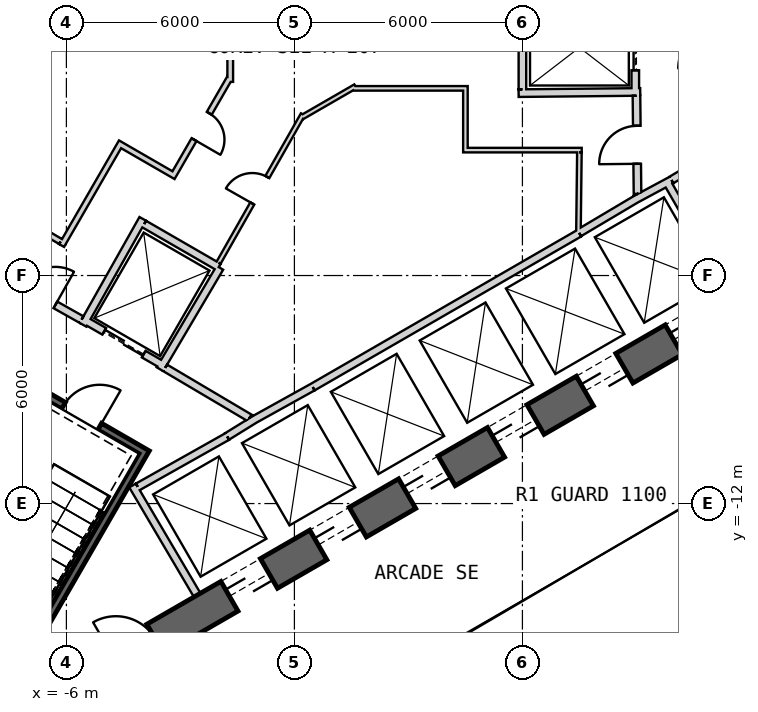
"""IFC4 building model, lengths in metres.
Left out: names, types, materials, properties, quantities, classifications, styles, units other than length and angle.
Written with IfcOpenShell. Run it as: python <this file> out.ifc"""

import sys

from ifc_helpers import new_model, si_unit, direction, frame, frame_2d, origin, place, context, subcontext, project, spatial, rectangle, extrude, element, fill, save


model = new_model("IFC4")
c1 = context("Model", 3, precision=1e-05, world=origin(), true_north=direction((0.0, 1.0)))
c2 = subcontext(c1, "Body", "Model", "MODEL_VIEW")
j1 = project(units=[si_unit("LENGTHUNIT", "METRE"), si_unit("PLANEANGLEUNIT", "RADIAN")], contexts=[c1])
p1 = place(None, origin())
s1 = spatial("IfcSite", under=j1, at=p1, CompositionType="ELEMENT")
p2 = place(p1, origin())
s2 = spatial("IfcBuilding", under=s1, at=p2, CompositionType="ELEMENT")
p3 = place(p2, frame((0.0, 0.0, 27.5)))
s3 = spatial("IfcBuildingStorey", under=s2, at=p3, CompositionType="ELEMENT", Elevation=27.5)
p4 = place(p3, frame((-7.825, -17.97, 0.0), z_axis=(0.0, 0.0, 1.0), x_axis=(0.866028369851, 0.499994862586, 0.0)))
e1 = element("IfcWall", 1, at=p4, inside=s3, PredefinedType="SHEAR", context=c2, shape_type="SweptSolid", body=[
    extrude(rectangle(XDim=31.523, YDim=0.9, at=frame_2d((15.762, 0.0))), origin(), (0.0, 0.0, 1.0), 6.0),
])
p5 = place(p4, frame((7.062, 0.0, 0.0)))
e2 = element("IfcOpeningElement", 2, at=p5, cuts=e1, PredefinedType="OPENING", context=c2, shape_type="SweptSolid", body=[
    extrude(rectangle(XDim=1.2, YDim=2.4, at=frame_2d((0.6, 1.2))), frame((0.0, 0.46, 0.0), z_axis=(0.0, -1.0, 0.0), x_axis=(1.0, 0.0, 0.0)), (0.0, 0.0, 1.0), 0.92),
])
p6 = place(p4, frame((9.762, 0.0, 0.0)))
e3 = element("IfcOpeningElement", 3, at=p6, cuts=e1, PredefinedType="OPENING", context=c2, shape_type="SweptSolid", body=[
    extrude(rectangle(XDim=1.2, YDim=2.4, at=frame_2d((0.6, 1.2))), frame((0.0, 0.46, 0.0), z_axis=(0.0, -1.0, 0.0), x_axis=(1.0, 0.0, 0.0)), (0.0, 0.0, 1.0), 0.92),
])
p7 = place(p4, frame((12.462, 0.0, 0.0)))
e4 = element("IfcOpeningElement", 4, at=p7, cuts=e1, PredefinedType="OPENING", context=c2, shape_type="SweptSolid", body=[
    extrude(rectangle(XDim=1.2, YDim=2.4, at=frame_2d((0.6, 1.2))), frame((0.0, 0.46, 0.0), z_axis=(0.0, -1.0, 0.0), x_axis=(1.0, 0.0, 0.0)), (0.0, 0.0, 1.0), 0.92),
])
p8 = place(p4, frame((15.162, 0.0, 0.0)))
e5 = element("IfcOpeningElement", 5, at=p8, cuts=e1, PredefinedType="OPENING", context=c2, shape_type="SweptSolid", body=[
    extrude(rectangle(XDim=1.2, YDim=2.4, at=frame_2d((0.6, 1.2))), frame((0.0, 0.46, 0.0), z_axis=(0.0, -1.0, 0.0), x_axis=(1.0, 0.0, 0.0)), (0.0, 0.0, 1.0), 0.92),
])
p9 = place(p4, frame((17.862, 0.0, 0.0)))
e6 = element("IfcOpeningElement", 6, at=p9, cuts=e1, PredefinedType="OPENING", context=c2, shape_type="SweptSolid", body=[
    extrude(rectangle(XDim=1.2, YDim=2.4, at=frame_2d((0.6, 1.2))), frame((0.0, 0.46, 0.0), z_axis=(0.0, -1.0, 0.0), x_axis=(1.0, 0.0, 0.0)), (0.0, 0.0, 1.0), 0.92),
])
p10 = place(p4, frame((20.562, 0.0, 0.0)))
e7 = element("IfcOpeningElement", 7, at=p10, cuts=e1, PredefinedType="OPENING", context=c2, shape_type="SweptSolid", body=[
    extrude(rectangle(XDim=1.2, YDim=2.4, at=frame_2d((0.6, 1.2))), frame((0.0, 0.46, 0.0), z_axis=(0.0, -1.0, 0.0), x_axis=(1.0, 0.0, 0.0)), (0.0, 0.0, 1.0), 0.92),
])
p11 = place(p4, frame((26.712, 0.0, 0.0)))
e8 = element("IfcOpeningElement", 8, at=p11, cuts=e1, PredefinedType="OPENING", context=c2, shape_type="SweptSolid", body=[
    extrude(rectangle(XDim=1.2, YDim=2.4, at=frame_2d((0.6, 1.2))), frame((0.0, 0.46, 0.0), z_axis=(0.0, -1.0, 0.0), x_axis=(1.0, 0.0, 0.0)), (0.0, 0.0, 1.0), 0.92),
])
p12 = place(p4, frame((3.612, 0.0, 0.0)))
e9 = element("IfcOpeningElement", 9, at=p12, cuts=e1, PredefinedType="OPENING", context=c2, shape_type="SweptSolid", body=[
    extrude(rectangle(XDim=1.2, YDim=2.4, at=frame_2d((0.6, 1.2))), frame((0.0, 0.46, 0.0), z_axis=(0.0, -1.0, 0.0), x_axis=(1.0, 0.0, 0.0)), (0.0, 0.0, 1.0), 0.92),
])
p13 = place(p3, frame((0.483, -8.936, 0.0), z_axis=(0.0, 0.0, 1.0), x_axis=(0.866030989016, 0.499990325971, 0.0)))
e10 = element("IfcWall", 10, at=p13, inside=s3, PredefinedType="PLUMBINGWALL", context=c2, shape_type="SweptSolid", body=[
    extrude(rectangle(XDim=8.1, YDim=0.2, at=frame_2d((4.05, 0.0))), origin(), (0.0, 0.0, 1.0), 5.7),
])
p14 = place(p3, frame((9.795, -3.525, 0.0), z_axis=(0.0, 0.0, 1.0), x_axis=(0.499984717929, -0.866034226713, 0.0)))
e11 = element("IfcWall", 11, at=p14, inside=s3, PredefinedType="PLUMBINGWALL", context=c2, shape_type="SweptSolid", body=[
    extrude(rectangle(XDim=3.25, YDim=0.2, at=frame_2d((1.625, 0.0))), origin(), (0.0, 0.0, 1.0), 5.7),
])
p15 = place(p3, frame((8.974, -3.999, 0.0), z_axis=(0.0, 0.0, 1.0), x_axis=(0.880907015104, 0.473289373154, 0.0)))
e12 = element("IfcWall", 12, at=p15, inside=s3, PredefinedType="PLUMBINGWALL", context=c2, shape_type="SweptSolid", body=[
    extrude(rectangle(XDim=1.078, YDim=0.2, at=frame_2d((0.539, 0.0))), origin(), (0.0, 0.0, 1.0), 5.7),
])
p16 = place(p3, frame((7.493, -4.878, 0.0), z_axis=(0.0, 0.0, 1.0), x_axis=(0.859981807212, 0.510324691999, 0.0)))
e13 = element("IfcWall", 13, at=p16, inside=s3, PredefinedType="PLUMBINGWALL", context=c2, shape_type="SweptSolid", body=[
    extrude(rectangle(XDim=1.845, YDim=0.2, at=frame_2d((0.922, 0.0))), origin(), (0.0, 0.0, 1.0), 5.7),
])
p17 = place(p3, frame((-2.558, -14.409, 0.0), z_axis=(0.0, 0.0, 1.0), x_axis=(-0.507997497166, 0.861358544901, 0.0)))
e14 = element("IfcWall", 14, at=p17, inside=s3, PredefinedType="PLUMBINGWALL", context=c2, shape_type="SweptSolid", body=[
    extrude(rectangle(XDim=3.35, YDim=0.2, at=frame_2d((1.675, 0.0))), origin(), (0.0, 0.0, 1.0), 5.7),
])
p18 = place(p3, frame((-1.769, -10.237, 0.0), z_axis=(0.0, 0.0, 1.0), x_axis=(-0.871534483978, -0.490334215854, 0.0)))
e15 = element("IfcWall", 15, at=p18, inside=s3, PredefinedType="PLUMBINGWALL", context=c2, shape_type="SweptSolid", body=[
    extrude(rectangle(XDim=2.7, YDim=0.2, at=frame_2d((1.35, 0.0))), origin(), (0.0, 0.0, 1.0), 5.7),
])
p19 = place(p3, frame((-1.024, -9.771, 0.0), z_axis=(0.0, 0.0, 1.0), x_axis=(-0.850348075135, -0.526220629693, 0.0)))
e16 = element("IfcWall", 16, at=p19, inside=s3, PredefinedType="PLUMBINGWALL", context=c2, shape_type="SweptSolid", body=[
    extrude(rectangle(XDim=0.878, YDim=0.2, at=frame_2d((0.439, 0.0))), origin(), (0.0, 0.0, 1.0), 5.7),
])
p20 = place(p3, frame((-1.13, -9.831, 0.0), z_axis=(0.0, 0.0, 1.0), x_axis=(0.874269620932, 0.485440655401, 0.0)))
e17 = element("IfcWall", 17, at=p20, inside=s3, PredefinedType="PLUMBINGWALL", context=c2, shape_type="SweptSolid", body=[
    extrude(rectangle(XDim=1.845, YDim=0.2, at=frame_2d((0.922, 0.0))), origin(), (0.0, 0.0, 1.0), 5.7),
])
p21 = place(p3, frame((8.97, 1.2, 0.0), z_axis=(0.0, 0.0, 1.0), x_axis=(0.0, -1.0, 0.0)))
e18 = element("IfcWall", 18, at=p21, inside=s3, PredefinedType="PLUMBINGWALL", context=c2, shape_type="SweptSolid", body=[
    extrude(rectangle(XDim=2.4, YDim=0.2, at=frame_2d((1.2, 0.0))), origin(), (0.0, 0.0, 1.0), 5.7),
])
p22 = place(p21, frame((0.6, 0.0, 0.0)))
e19 = element("IfcOpeningElement", 19, at=p22, cuts=e18, PredefinedType="OPENING", context=c2, shape_type="SweptSolid", body=[
    extrude(rectangle(XDim=1.2, YDim=2.4, at=frame_2d((0.6, 1.2))), frame((0.0, 0.11, 0.0), z_axis=(0.0, -1.0, 0.0), x_axis=(1.0, 0.0, 0.0)), (0.0, 0.0, 1.0), 0.22),
])
p23 = place(p3, frame((5.9, -1.201, 0.0), z_axis=(0.0, 0.0, 1.0), x_axis=(0.999950064753, 0.009993397809, 0.0)))
e20 = element("IfcWall", 20, at=p23, inside=s3, PredefinedType="PLUMBINGWALL", context=c2, shape_type="SweptSolid", body=[
    extrude(rectangle(XDim=3.2, YDim=0.2, at=frame_2d((1.6, 0.0))), origin(), (0.0, 0.0, 1.0), 5.7),
])
p24 = place(p3, frame((6.0, -1.1, 0.0), z_axis=(0.0, 0.0, 1.0), x_axis=(0.0, 1.0, 0.0)))
e21 = element("IfcWall", 21, at=p24, inside=s3, PredefinedType="PLUMBINGWALL", context=c2, shape_type="SweptSolid", body=[
    extrude(rectangle(XDim=2.28, YDim=0.2, at=frame_2d((1.14, 0.0))), origin(), (0.0, 0.0, 1.0), 5.7),
])
p25 = place(p3, frame((-3.905, -10.563, -0.3), z_axis=(0.0, 0.0, 1.0), x_axis=(-0.500012932018, -0.866017937352, 0.0)))
e22 = element("IfcWall", 22, at=p25, inside=s3, PredefinedType="SHEAR", context=c2, shape_type="SweptSolid", body=[
    extrude(rectangle(XDim=8.1, YDim=0.2, at=frame_2d((4.05, 0.0))), origin(), (0.0, 0.0, 1.0), 6.0),
])
p26 = place(p3, frame((-4.041, -10.599, -0.3), z_axis=(0.0, 0.0, 1.0), x_axis=(-0.866047807691, 0.499961193289, 0.0)))
e23 = element("IfcWall", 23, at=p26, inside=s3, PredefinedType="SHEAR", context=c2, shape_type="SweptSolid", body=[
    extrude(rectangle(XDim=3.6, YDim=0.2, at=frame_2d((1.8, 0.0))), origin(), (0.0, 0.0, 1.0), 6.0),
])
p27 = place(p26, frame((1.25, 0.0, 0.3)))
e24 = element("IfcOpeningElement", 24, at=p27, cuts=e23, PredefinedType="OPENING", context=c2, shape_type="SweptSolid", body=[
    extrude(rectangle(XDim=1.1, YDim=2.1, at=frame_2d((0.55, 1.05))), frame((0.0, 0.11, 0.0), z_axis=(0.0, -1.0, 0.0), x_axis=(1.0, 0.0, 0.0)), (0.0, 0.0, 1.0), 0.22),
])
p28 = place(p3, frame((-3.446, -8.368, 0.0), z_axis=(0.0, 0.0, 1.0), x_axis=(-0.866024647952, 0.500001309137, 0.0)))
e25 = element("IfcWall", 25, at=p28, inside=s3, PredefinedType="PLUMBINGWALL", context=c2, shape_type="SweptSolid", body=[
    extrude(rectangle(XDim=2.4, YDim=0.2, at=frame_2d((1.2, 0.0))), origin(), (0.0, 0.0, 1.0), 5.7),
])
p29 = place(p28, frame((0.6, 0.0, 0.0)))
e26 = element("IfcOpeningElement", 26, at=p29, cuts=e25, PredefinedType="OPENING", context=c2, shape_type="SweptSolid", body=[
    extrude(rectangle(XDim=1.2, YDim=2.4, at=frame_2d((0.6, 1.2))), frame((0.0, 0.11, 0.0), z_axis=(0.0, -1.0, 0.0), x_axis=(1.0, 0.0, 0.0)), (0.0, 0.0, 1.0), 0.22),
])
p30 = place(p3, frame((-1.961, -5.796, 0.0), z_axis=(0.0, 0.0, 1.0), x_axis=(-0.508647062354, -0.860975125052, 0.0)))
e27 = element("IfcWall", 27, at=p30, inside=s3, PredefinedType="PLUMBINGWALL", context=c2, shape_type="SweptSolid", body=[
    extrude(rectangle(XDim=3.1, YDim=0.2, at=frame_2d((1.55, 0.0))), origin(), (0.0, 0.0, 1.0), 5.7),
])
p31 = place(p3, frame((-3.99, -4.509, 0.0), z_axis=(0.0, 0.0, 1.0), x_axis=(-0.491358283181, -0.870957540612, 0.0)))
e28 = element("IfcWall", 28, at=p31, inside=s3, PredefinedType="PLUMBINGWALL", context=c2, shape_type="SweptSolid", body=[
    extrude(rectangle(XDim=3.2, YDim=0.2, at=frame_2d((1.6, 0.0))), origin(), (0.0, 0.0, 1.0), 5.7),
])
p32 = place(p3, frame((-3.953, -4.646, 0.0), z_axis=(0.0, 0.0, 1.0), x_axis=(0.866065302921, -0.4999308863, 0.0)))
e29 = element("IfcWall", 29, at=p32, inside=s3, PredefinedType="PLUMBINGWALL", context=c2, shape_type="SweptSolid", body=[
    extrude(rectangle(XDim=2.264, YDim=0.2, at=frame_2d((1.132, 0.0))), origin(), (0.0, 0.0, 1.0), 5.7),
])
p33 = place(p3, frame((12.245, -2.109, 0.0), z_axis=(0.0, 0.0, 1.0), x_axis=(-0.860414880418, -0.509594185166, 0.0)))
e30 = element("IfcWall", 30, at=p33, inside=s3, PredefinedType="PARTITIONING", context=c2, shape_type="SweptSolid", body=[
    extrude(rectangle(XDim=2.7, YDim=0.2, at=frame_2d((1.35, 0.0))), origin(), (0.0, 0.0, 1.0), 5.7),
])
p34 = place(p3, frame((9.029, -3.851, 0.0), z_axis=(0.0, 0.0, 1.0), x_axis=(-0.010783593937, 0.99994185536, 0.0)))
e31 = element("IfcWall", 31, at=p34, inside=s3, PredefinedType="PARTITIONING", context=c2, shape_type="SweptSolid", body=[
    extrude(rectangle(XDim=2.581, YDim=0.2, at=frame_2d((1.291, 0.0))), origin(), (0.0, 0.0, 1.0), 5.7),
])
p35 = place(p34, frame((0.791, 0.0, 0.0)))
e32 = element("IfcOpeningElement", 32, at=p35, cuts=e31, PredefinedType="OPENING", context=c2, shape_type="SweptSolid", body=[
    extrude(rectangle(XDim=1.0, YDim=2.1, at=frame_2d((0.5, 1.05))), frame((0.0, 0.11, 0.0), z_axis=(0.0, -1.0, 0.0), x_axis=(1.0, 0.0, 0.0)), (0.0, 0.0, 1.0), 0.22),
])
p36 = place(p3, frame((-3.401, -8.43, 0.0), z_axis=(0.0, 0.0, 1.0), x_axis=(0.860615607571, -0.509255118781, 0.0)))
e33 = element("IfcWall", 33, at=p36, inside=s3, PredefinedType="PARTITIONING", context=c2, shape_type="SweptSolid", body=[
    extrude(rectangle(XDim=2.581, YDim=0.2, at=frame_2d((1.29, 0.0))), origin(), (0.0, 0.0, 1.0), 5.7),
])
p37 = place(p3, frame((-7.849, -5.894, 0.0), z_axis=(0.0, 0.0, 1.0), x_axis=(0.871363259478, -0.490638431059, 0.0)))
e34 = element("IfcWall", 34, at=p37, inside=s3, PredefinedType="PARTITIONING", context=c2, shape_type="SweptSolid", body=[
    extrude(rectangle(XDim=2.581, YDim=0.2, at=frame_2d((1.291, 0.0))), origin(), (0.0, 0.0, 1.0), 5.7),
])
p38 = place(p37, frame((0.791, 0.0, 0.0)))
e35 = element("IfcOpeningElement", 35, at=p38, cuts=e34, PredefinedType="OPENING", context=c2, shape_type="SweptSolid", body=[
    extrude(rectangle(XDim=1.0, YDim=2.1, at=frame_2d((0.5, 1.05))), frame((0.0, 0.11, 0.0), z_axis=(0.0, -1.0, 0.0), x_axis=(1.0, 0.0, 0.0)), (0.0, 0.0, 1.0), 0.22),
])
p39 = place(p3, frame((0.224, -1.761, 0.0), z_axis=(0.0, 0.0, 1.0), x_axis=(-0.494327216836, -0.869275907118, 0.0)))
e36 = element("IfcWall", 36, at=p39, inside=s3, PredefinedType="PARTITIONING", context=c2, shape_type="SweptSolid", body=[
    extrude(rectangle(XDim=4.487, YDim=0.12, at=frame_2d((2.244, 0.0))), origin(), (0.0, 0.0, 1.0), 5.7),
])
p40 = place(p39, frame((1.895, 0.0, 0.0)))
e37 = element("IfcOpeningElement", 37, at=p40, cuts=e36, PredefinedType="OPENING", context=c2, shape_type="SweptSolid", body=[
    extrude(rectangle(XDim=0.8, YDim=2.1, at=frame_2d((0.4, 1.05))), frame((0.0, 0.07, 0.0), z_axis=(0.0, -1.0, 0.0), x_axis=(1.0, 0.0, 0.0)), (0.0, 0.0, 1.0), 0.14),
])
p41 = place(p3, frame((1.605, -1.023, 0.0), z_axis=(0.0, 0.0, 1.0), x_axis=(-0.866001581989, -0.50004125829, 0.0)))
e38 = element("IfcWall", 38, at=p41, inside=s3, PredefinedType="PARTITIONING", context=c2, shape_type="SweptSolid", body=[
    extrude(rectangle(XDim=1.635, YDim=0.12, at=frame_2d((0.817, 0.0))), origin(), (0.0, 0.0, 1.0), 5.7),
])
p42 = place(p3, frame((4.56, -1.075, 0.0), z_axis=(0.0, 0.0, 1.0), x_axis=(-1.0, 0.0, 0.0)))
e39 = element("IfcWall", 39, at=p42, inside=s3, PredefinedType="PARTITIONING", context=c2, shape_type="SweptSolid", body=[
    extrude(rectangle(XDim=3.026, YDim=0.12, at=frame_2d((1.513, 0.0))), origin(), (0.0, 0.0, 1.0), 5.7),
])
p43 = place(p3, frame((4.5, -2.76, 0.0), z_axis=(0.0, 0.0, 1.0), x_axis=(0.0, 1.0, 0.0)))
e40 = element("IfcWall", 40, at=p43, inside=s3, PredefinedType="PARTITIONING", context=c2, shape_type="SweptSolid", body=[
    extrude(rectangle(XDim=1.625, YDim=0.12, at=frame_2d((0.812, 0.0))), origin(), (0.0, 0.0, 1.0), 5.7),
])
p44 = place(p3, frame((7.56, -2.7, 0.0), z_axis=(0.0, 0.0, 1.0), x_axis=(-1.0, 0.0, 0.0)))
e41 = element("IfcWall", 41, at=p44, inside=s3, PredefinedType="PARTITIONING", context=c2, shape_type="SweptSolid", body=[
    extrude(rectangle(XDim=3.0, YDim=0.12, at=frame_2d((1.5, 0.0))), origin(), (0.0, 0.0, 1.0), 5.7),
])
p45 = place(p3, frame((7.475, -4.865, 0.0), z_axis=(0.0, 0.0, 1.0), x_axis=(0.011716133148, 0.999931363757, 0.0)))
e42 = element("IfcWall", 42, at=p45, inside=s3, PredefinedType="PARTITIONING", context=c2, shape_type="SweptSolid", body=[
    extrude(rectangle(XDim=2.105, YDim=0.12, at=frame_2d((1.052, 0.0))), origin(), (0.0, 0.0, 1.0), 5.7),
])
p46 = place(p3, frame((-1.689, -0.905, 0.0), z_axis=(0.0, 0.0, 1.0), x_axis=(0.0, 1.0, 0.0)))
e43 = element("IfcWall", 43, at=p46, inside=s3, PredefinedType="PLUMBINGWALL", context=c2, shape_type="SweptSolid", body=[
    extrude(rectangle(XDim=1.656, YDim=0.15, at=frame_2d((0.828, 0.0))), origin(), (0.0, 0.0, 1.0), 5.7),
])
p47 = place(p3, frame((-3.219, -3.425, 0.0), z_axis=(0.0, 0.0, 1.0), x_axis=(0.499996236806, 0.866027576455, 0.0)))
e44 = element("IfcWall", 44, at=p47, inside=s3, PredefinedType="PLUMBINGWALL", context=c2, shape_type="SweptSolid", body=[
    extrude(rectangle(XDim=3.036, YDim=0.15, at=frame_2d((1.518, 0.0))), origin(), (0.0, 0.0, 1.0), 5.7),
])
p48 = place(p47, frame((1.156, 0.0, 0.0)))
e45 = element("IfcOpeningElement", 45, at=p48, cuts=e44, PredefinedType="OPENING", context=c2, shape_type="SweptSolid", body=[
    extrude(rectangle(XDim=0.8, YDim=2.1, at=frame_2d((0.4, 1.05))), frame((0.0, 0.085, 0.0), z_axis=(0.0, -1.0, 0.0), x_axis=(1.0, 0.0, 0.0)), (0.0, 0.0, 1.0), 0.17),
])
p49 = place(p3, frame((-4.653, -2.51, 0.0), z_axis=(0.0, 0.0, 1.0), x_axis=(0.866053003207, -0.499952193351, 0.0)))
e46 = element("IfcWall", 46, at=p49, inside=s3, PredefinedType="PLUMBINGWALL", context=c2, shape_type="SweptSolid", body=[
    extrude(rectangle(XDim=1.625, YDim=0.15, at=frame_2d((0.812, 0.0))), origin(), (0.0, 0.0, 1.0), 5.7),
])
p50 = place(p3, frame((-6.126, -5.21, 0.0), z_axis=(0.0, 0.0, 1.0), x_axis=(0.499990139034, 0.866031096941, 0.0)))
e47 = element("IfcWall", 47, at=p50, inside=s3, PredefinedType="PLUMBINGWALL", context=c2, shape_type="SweptSolid", body=[
    extrude(rectangle(XDim=3.0, YDim=0.15, at=frame_2d((1.5, 0.0))), origin(), (0.0, 0.0, 1.0), 5.7),
])
p51 = place(p3, frame((-7.95, -4.041, 0.0), z_axis=(0.0, 0.0, 1.0), x_axis=(0.860090281069, -0.510141851263, 0.0)))
e48 = element("IfcWall", 48, at=p51, inside=s3, PredefinedType="PLUMBINGWALL", context=c2, shape_type="SweptSolid", body=[
    extrude(rectangle(XDim=2.089, YDim=0.15, at=frame_2d((1.045, 0.0))), origin(), (0.0, 0.0, 1.0), 5.7),
])
p52 = place(p35, origin())
e49 = element("IfcDoor", 49, at=p52, inside=s3, OperationType="SINGLE_SWING_LEFT", PredefinedType="USERDEFINED", context=c2, shape_type="SweptSolid", body=[
    extrude(rectangle(XDim=1.0, YDim=2.1, at=frame_2d((0.5, 1.05))), frame((0.0, 0.025, 0.0), z_axis=(0.0, -1.0, 0.0), x_axis=(1.0, 0.0, 0.0)), (0.0, 0.0, 1.0), 0.05),
])
fill(e32, e49)
p53 = place(p22, origin())
e50 = element("IfcDoor", 50, at=p53, inside=s3, OperationType="SLIDING_TO_LEFT", PredefinedType="USERDEFINED", context=c2, shape_type="SweptSolid", body=[
    extrude(rectangle(XDim=1.2, YDim=2.4, at=frame_2d((0.6, 1.2))), frame((0.0, 0.025, 0.0), z_axis=(0.0, -1.0, 0.0), x_axis=(1.0, 0.0, 0.0)), (0.0, 0.0, 1.0), 0.05),
])
fill(e19, e50)
p54 = place(p27, origin())
e51 = element("IfcDoor", 51, at=p54, inside=s3, OperationType="SINGLE_SWING_LEFT", PredefinedType="USERDEFINED", context=c2, shape_type="SweptSolid", body=[
    extrude(rectangle(XDim=1.1, YDim=2.1, at=frame_2d((0.55, 1.05))), frame((0.0, 0.025, 0.0), z_axis=(0.0, -1.0, 0.0), x_axis=(1.0, 0.0, 0.0)), (0.0, 0.0, 1.0), 0.05),
])
fill(e24, e51)
p55 = place(p38, origin())
e52 = element("IfcDoor", 52, at=p55, inside=s3, OperationType="SINGLE_SWING_RIGHT", PredefinedType="USERDEFINED", context=c2, shape_type="SweptSolid", body=[
    extrude(rectangle(XDim=1.0, YDim=2.1, at=frame_2d((0.5, 1.05))), frame((0.0, 0.025, 0.0), z_axis=(0.0, -1.0, 0.0), x_axis=(1.0, 0.0, 0.0)), (0.0, 0.0, 1.0), 0.05),
])
fill(e35, e52)
p56 = place(p29, origin())
e53 = element("IfcDoor", 53, at=p56, inside=s3, OperationType="SLIDING_TO_LEFT", PredefinedType="USERDEFINED", context=c2, shape_type="SweptSolid", body=[
    extrude(rectangle(XDim=1.2, YDim=2.4, at=frame_2d((0.6, 1.2))), frame((0.0, 0.025, 0.0), z_axis=(0.0, -1.0, 0.0), x_axis=(1.0, 0.0, 0.0)), (0.0, 0.0, 1.0), 0.05),
])
fill(e26, e53)
p57 = place(p40, origin())
e54 = element("IfcDoor", 54, at=p57, inside=s3, OperationType="SINGLE_SWING_RIGHT", PredefinedType="USERDEFINED", context=c2, shape_type="SweptSolid", body=[
    extrude(rectangle(XDim=0.8, YDim=2.1, at=frame_2d((0.4, 1.05))), frame((0.0, 0.025, 0.0), z_axis=(0.0, -1.0, 0.0), x_axis=(1.0, 0.0, 0.0)), (0.0, 0.0, 1.0), 0.05),
])
fill(e37, e54)
p58 = place(p48, origin())
e55 = element("IfcDoor", 55, at=p58, inside=s3, OperationType="SINGLE_SWING_LEFT", PredefinedType="USERDEFINED", context=c2, shape_type="SweptSolid", body=[
    extrude(rectangle(XDim=0.8, YDim=2.1, at=frame_2d((0.4, 1.05))), frame((0.0, 0.025, 0.0), z_axis=(0.0, -1.0, 0.0), x_axis=(1.0, 0.0, 0.0)), (0.0, 0.0, 1.0), 0.05),
])
fill(e45, e55)
p59 = place(p5, origin())
e56 = element("IfcDoor", 56, at=p59, inside=s3, OperationType="SLIDING_TO_LEFT", PredefinedType="USERDEFINED", context=c2, shape_type="SweptSolid", body=[
    extrude(rectangle(XDim=1.2, YDim=2.4, at=frame_2d((0.6, 1.2))), frame((0.0, 0.025, 0.0), z_axis=(0.0, -1.0, 0.0), x_axis=(1.0, 0.0, 0.0)), (0.0, 0.0, 1.0), 0.05),
])
fill(e2, e56)
p60 = place(p6, origin())
e57 = element("IfcDoor", 57, at=p60, inside=s3, OperationType="SLIDING_TO_LEFT", PredefinedType="USERDEFINED", context=c2, shape_type="SweptSolid", body=[
    extrude(rectangle(XDim=1.2, YDim=2.4, at=frame_2d((0.6, 1.2))), frame((0.0, 0.025, 0.0), z_axis=(0.0, -1.0, 0.0), x_axis=(1.0, 0.0, 0.0)), (0.0, 0.0, 1.0), 0.05),
])
fill(e3, e57)
p61 = place(p7, origin())
e58 = element("IfcDoor", 58, at=p61, inside=s3, OperationType="SLIDING_TO_LEFT", PredefinedType="USERDEFINED", context=c2, shape_type="SweptSolid", body=[
    extrude(rectangle(XDim=1.2, YDim=2.4, at=frame_2d((0.6, 1.2))), frame((0.0, 0.025, 0.0), z_axis=(0.0, -1.0, 0.0), x_axis=(1.0, 0.0, 0.0)), (0.0, 0.0, 1.0), 0.05),
])
fill(e4, e58)
p62 = place(p8, origin())
e59 = element("IfcDoor", 59, at=p62, inside=s3, OperationType="SLIDING_TO_LEFT", PredefinedType="USERDEFINED", context=c2, shape_type="SweptSolid", body=[
    extrude(rectangle(XDim=1.2, YDim=2.4, at=frame_2d((0.6, 1.2))), frame((0.0, 0.025, 0.0), z_axis=(0.0, -1.0, 0.0), x_axis=(1.0, 0.0, 0.0)), (0.0, 0.0, 1.0), 0.05),
])
fill(e5, e59)
p63 = place(p9, origin())
e60 = element("IfcDoor", 60, at=p63, inside=s3, OperationType="SLIDING_TO_LEFT", PredefinedType="USERDEFINED", context=c2, shape_type="SweptSolid", body=[
    extrude(rectangle(XDim=1.2, YDim=2.4, at=frame_2d((0.6, 1.2))), frame((0.0, 0.025, 0.0), z_axis=(0.0, -1.0, 0.0), x_axis=(1.0, 0.0, 0.0)), (0.0, 0.0, 1.0), 0.05),
])
fill(e6, e60)
p64 = place(p10, origin())
e61 = element("IfcDoor", 61, at=p64, inside=s3, OperationType="SLIDING_TO_LEFT", PredefinedType="USERDEFINED", context=c2, shape_type="SweptSolid", body=[
    extrude(rectangle(XDim=1.2, YDim=2.4, at=frame_2d((0.6, 1.2))), frame((0.0, 0.025, 0.0), z_axis=(0.0, -1.0, 0.0), x_axis=(1.0, 0.0, 0.0)), (0.0, 0.0, 1.0), 0.05),
])
fill(e7, e61)
save(model, sys.argv[1])
